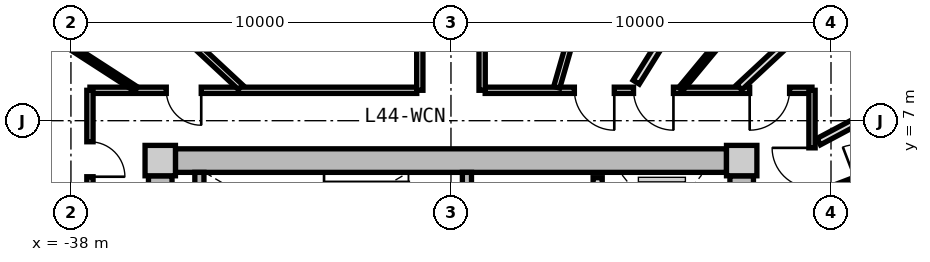
"""IFC4 building model, lengths in metres.
Left out: names, types, materials, properties, quantities, classifications, styles, units other than length and angle.
Written with IfcOpenShell. Run it as: python <this file> out.ifc"""

import sys

from ifc_helpers import new_model, si_unit, direction, frame, frame_2d, origin, origin_2d, place, context, subcontext, project, spatial, rectangle, extrude, source, transform, mapped, element, fill, save


model = new_model("IFC4")
c1 = context("Model", 3, precision=1e-05, world=origin(), true_north=direction((0.0, 1.0)))
c2 = subcontext(c1, "Body", "Model", "MODEL_VIEW")
j1 = project(units=[si_unit("LENGTHUNIT", "METRE"), si_unit("PLANEANGLEUNIT", "RADIAN")], contexts=[c1])
p1 = place(None, origin())
s1 = spatial("IfcSite", under=j1, at=p1, CompositionType="ELEMENT")
p2 = place(p1, origin())
s2 = spatial("IfcBuilding", under=s1, at=p2, CompositionType="ELEMENT")
p3 = place(p2, frame((0.0, 0.0, 143.45)))
s3 = spatial("IfcBuildingStorey", under=s2, at=p3, CompositionType="ELEMENT", Elevation=143.45)
m1 = source(origin(), c2, "Body", "SweptSolid", [
    extrude(rectangle(XDim=0.8, YDim=0.8, at=origin_2d()), origin(), (0.0, 0.0, 1.0), 3.05),
])
for number, where, z_axis, x_axis in (
    (1, (-20.35, 5.95, 0.0), (0.0, 0.0, 1.0), (1.0, 0.0, 0.0)),
    (2, (-35.65, 5.95, 0.0), (0.0, 0.0, 1.0), (1.0, 0.0, 0.0)),
):
    element("IfcColumn", number, at=place(p3, frame(where, z_axis=z_axis, x_axis=x_axis)), inside=s3, PredefinedType="COLUMN", context=c2, shape_type="MappedRepresentation", body=[
        mapped(m1, transform((0.0, 0.0, 0.0), x_axis=(1.0, 0.0, 0.0), y_axis=(0.0, 1.0, 0.0), z_axis=(0.0, 0.0, 1.0), scale=1.0)),
    ])
m2 = source(origin(), c2, "Body", "SweptSolid", [
    extrude(rectangle(XDim=14.5, YDim=0.62, at=frame_2d((7.25, 0.0))), origin(), (0.0, 0.0, 1.0), 2.81),
])
p4 = place(p3, frame((-35.25, 5.95, 0.0), z_axis=(0.0, 0.0, 1.0), x_axis=(1.0, 0.0, 0.0)))
e3 = element("IfcWall", 3, at=p4, inside=s3, PredefinedType="SHEAR", context=c2, shape_type="MappedRepresentation", body=[
    mapped(m2, transform((0.0, 0.0, 0.0), x_axis=(1.0, 0.0, 0.0), y_axis=(0.0, 1.0, 0.0), z_axis=(0.0, 0.0, 1.0), scale=1.0)),
])
m3 = source(origin(), c2, "Body", "SweptSolid", [
    extrude(rectangle(XDim=11.1, YDim=0.62, at=frame_2d((5.55, 0.0))), origin(), (0.0, 0.0, 1.0), 2.81),
])
p5 = place(p3, frame((-35.65, -5.55, 0.0), z_axis=(0.0, 0.0, 1.0), x_axis=(0.0, 1.0, 0.0)))
e4 = element("IfcWall", 4, at=p5, inside=s3, PredefinedType="SHEAR", context=c2, shape_type="MappedRepresentation", body=[
    mapped(m3, transform((0.0, 0.0, 0.0), x_axis=(1.0, 0.0, 0.0), y_axis=(0.0, 1.0, 0.0), z_axis=(0.0, 0.0, 1.0), scale=1.0)),
])
p6 = place(p5, frame((3.8, 0.0, 0.0)))
e5 = element("IfcOpeningElement", 5, at=p6, cuts=e4, PredefinedType="OPENING", context=c2, shape_type="SweptSolid", body=[
    extrude(rectangle(XDim=1.2, YDim=2.15, at=frame_2d((0.6, 1.075))), frame((0.0, 0.32, 0.0), z_axis=(0.0, -1.0, 0.0), x_axis=(1.0, 0.0, 0.0)), (0.0, 0.0, 1.0), 0.64),
])
p7 = place(p3, frame((-20.35, 5.55, 0.0), z_axis=(0.0, 0.0, 1.0), x_axis=(0.0, -1.0, 0.0)))
e6 = element("IfcWall", 6, at=p7, inside=s3, PredefinedType="SHEAR", context=c2, shape_type="MappedRepresentation", body=[
    mapped(m3, transform((0.0, 0.0, 0.0), x_axis=(1.0, 0.0, 0.0), y_axis=(0.0, 1.0, 0.0), z_axis=(0.0, 0.0, 1.0), scale=1.0)),
])
p8 = place(p7, frame((5.65, 0.0, 0.0)))
e7 = element("IfcOpeningElement", 7, at=p8, cuts=e6, PredefinedType="OPENING", context=c2, shape_type="SweptSolid", body=[
    extrude(rectangle(XDim=1.2, YDim=2.15, at=frame_2d((0.6, 1.075))), frame((0.0, 0.32, 0.0), z_axis=(0.0, -1.0, 0.0), x_axis=(1.0, 0.0, 0.0)), (0.0, 0.0, 1.0), 0.64),
])
m4 = source(origin(), c2, "Body", "SweptSolid", [
    extrude(rectangle(XDim=3.19, YDim=0.24, at=frame_2d((1.595, 0.0))), origin(), (0.0, 0.0, 1.0), 2.81),
])
p9 = place(p3, frame((-34.62, 2.45, 0.0), z_axis=(0.0, 0.0, 1.0), x_axis=(0.0, 1.0, 0.0)))
e8 = element("IfcWall", 8, at=p9, inside=s3, PredefinedType="PARTITIONING", context=c2, shape_type="MappedRepresentation", body=[
    mapped(m4, transform((0.0, 0.0, 0.0), x_axis=(1.0, 0.0, 0.0), y_axis=(0.0, 1.0, 0.0), z_axis=(0.0, 0.0, 1.0), scale=1.0)),
])
p10 = place(p3, frame((-27.58, 2.45, 0.0), z_axis=(0.0, 0.0, 1.0), x_axis=(0.0, 1.0, 0.0)))
e9 = element("IfcWall", 9, at=p10, inside=s3, PredefinedType="PARTITIONING", context=c2, shape_type="MappedRepresentation", body=[
    mapped(m4, transform((0.0, 0.0, 0.0), x_axis=(1.0, 0.0, 0.0), y_axis=(0.0, 1.0, 0.0), z_axis=(0.0, 0.0, 1.0), scale=1.0)),
])
p11 = place(p10, frame((0.55, 0.0, 0.0)))
e10 = element("IfcOpeningElement", 10, at=p11, cuts=e9, PredefinedType="OPENING", context=c2, shape_type="SweptSolid", body=[
    extrude(rectangle(XDim=1.1, YDim=2.15, at=frame_2d((0.55, 1.075))), frame((0.0, 0.13, 0.0), z_axis=(0.0, -1.0, 0.0), x_axis=(1.0, 0.0, 0.0)), (0.0, 0.0, 1.0), 0.26),
])
m5 = source(origin(), c2, "Body", "SweptSolid", [
    extrude(rectangle(XDim=5.0, YDim=0.24, at=frame_2d((2.5, 0.0))), origin(), (0.0, 0.0, 1.0), 2.795),
])
p12 = place(p3, frame((-24.14, 0.5, 0.0), z_axis=(0.0, 0.0, 1.0), x_axis=(0.0, 1.0, 0.0)))
e11 = element("IfcWall", 11, at=p12, inside=s3, PredefinedType="PARTITIONING", context=c2, shape_type="MappedRepresentation", body=[
    mapped(m5, transform((0.0, 0.0, 0.0), x_axis=(1.0, 0.0, 0.0), y_axis=(0.0, 1.0, 0.0), z_axis=(0.0, 0.0, 1.0), scale=1.0)),
])
p13 = place(p12, frame((3.05, 0.0, 0.0)))
e12 = element("IfcOpeningElement", 12, at=p13, cuts=e11, PredefinedType="OPENING", context=c2, shape_type="SweptSolid", body=[
    extrude(rectangle(XDim=1.3, YDim=2.2, at=frame_2d((0.65, 1.1))), frame((0.0, 0.13, 0.0), z_axis=(0.0, -1.0, 0.0), x_axis=(1.0, 0.0, 0.0)), (0.0, 0.0, 1.0), 0.26),
])
p14 = place(p12, frame((0.55, 0.0, 0.0)))
e13 = element("IfcOpeningElement", 13, at=p14, cuts=e11, PredefinedType="OPENING", context=c2, shape_type="SweptSolid", body=[
    extrude(rectangle(XDim=1.3, YDim=2.2, at=frame_2d((0.65, 1.1))), frame((0.0, 0.13, 0.0), z_axis=(0.0, -1.0, 0.0), x_axis=(1.0, 0.0, 0.0)), (0.0, 0.0, 1.0), 0.26),
])
m6 = source(origin(), c2, "Body", "SweptSolid", [
    extrude(rectangle(XDim=8.6, YDim=0.165, at=frame_2d((4.3, 0.0))), origin(), (0.0, 0.0, 1.0), 2.795),
])
p15 = place(p3, frame((-37.5, 7.8, 0.0), z_axis=(0.0, 0.0, 1.0), x_axis=(1.0, 0.0, 0.0)))
e14 = element("IfcWall", 14, at=p15, inside=s3, PredefinedType="PARTITIONING", context=c2, shape_type="MappedRepresentation", body=[
    mapped(m6, transform((0.0, 0.0, 0.0), x_axis=(1.0, 0.0, 0.0), y_axis=(0.0, 1.0, 0.0), z_axis=(0.0, 0.0, 1.0), scale=1.0)),
])
p16 = place(p15, frame((2.009, 0.0, 0.0)))
e15 = element("IfcOpeningElement", 15, at=p16, cuts=e14, PredefinedType="OPENING", context=c2, shape_type="SweptSolid", body=[
    extrude(rectangle(XDim=0.92, YDim=2.1, at=frame_2d((0.46, 1.05))), frame((0.0, 0.093, 0.0), z_axis=(0.0, -1.0, 0.0), x_axis=(1.0, 0.0, 0.0)), (0.0, 0.0, 1.0), 0.185),
])
p17 = place(p3, frame((-27.1, 7.8, 0.0), z_axis=(0.0, 0.0, 1.0), x_axis=(1.0, 0.0, 0.0)))
e16 = element("IfcWall", 16, at=p17, inside=s3, PredefinedType="PARTITIONING", context=c2, shape_type="MappedRepresentation", body=[
    mapped(m6, transform((0.0, 0.0, 0.0), x_axis=(1.0, 0.0, 0.0), y_axis=(0.0, 1.0, 0.0), z_axis=(0.0, 0.0, 1.0), scale=1.0)),
])
p18 = place(p17, frame((6.96, 0.0, 0.0)))
e17 = element("IfcOpeningElement", 17, at=p18, cuts=e16, PredefinedType="OPENING", context=c2, shape_type="SweptSolid", body=[
    extrude(rectangle(XDim=1.05, YDim=2.15, at=frame_2d((0.525, 1.075))), frame((0.0, 0.093, 0.0), z_axis=(0.0, -1.0, 0.0), x_axis=(1.0, 0.0, 0.0)), (0.0, 0.0, 1.0), 0.185),
])
p19 = place(p17, frame((3.904, 0.0, 0.0)))
e18 = element("IfcOpeningElement", 18, at=p19, cuts=e16, PredefinedType="OPENING", context=c2, shape_type="SweptSolid", body=[
    extrude(rectangle(XDim=1.05, YDim=2.15, at=frame_2d((0.525, 1.075))), frame((0.0, 0.093, 0.0), z_axis=(0.0, -1.0, 0.0), x_axis=(1.0, 0.0, 0.0)), (0.0, 0.0, 1.0), 0.185),
])
p20 = place(p17, frame((2.347, 0.0, 0.0)))
e19 = element("IfcOpeningElement", 19, at=p20, cuts=e16, PredefinedType="OPENING", context=c2, shape_type="SweptSolid", body=[
    extrude(rectangle(XDim=1.05, YDim=2.15, at=frame_2d((0.525, 1.075))), frame((0.0, 0.093, 0.0), z_axis=(0.0, -1.0, 0.0), x_axis=(1.0, 0.0, 0.0)), (0.0, 0.0, 1.0), 0.185),
])
m7 = source(origin(), c2, "Body", "SweptSolid", [
    extrude(rectangle(XDim=15.6, YDim=0.165, at=frame_2d((7.8, 0.0))), origin(), (0.0, 0.0, 1.0), 2.795),
])
p21 = place(p3, frame((-37.5, -7.8, 0.0), z_axis=(0.0, 0.0, 1.0), x_axis=(0.0, 1.0, 0.0)))
e20 = element("IfcWall", 20, at=p21, inside=s3, PredefinedType="PARTITIONING", context=c2, shape_type="MappedRepresentation", body=[
    mapped(m7, transform((0.0, 0.0, 0.0), x_axis=(1.0, 0.0, 0.0), y_axis=(0.0, 1.0, 0.0), z_axis=(0.0, 0.0, 1.0), scale=1.0)),
])
p22 = place(p21, frame((13.325, 0.0, 0.0)))
e21 = element("IfcOpeningElement", 21, at=p22, cuts=e20, PredefinedType="OPENING", context=c2, shape_type="SweptSolid", body=[
    extrude(rectangle(XDim=0.92, YDim=2.1, at=frame_2d((0.46, 1.05))), frame((0.0, 0.093, 0.0), z_axis=(0.0, -1.0, 0.0), x_axis=(1.0, 0.0, 0.0)), (0.0, 0.0, 1.0), 0.185),
])
p23 = place(p21, frame((5.628, 0.0, 0.0)))
e22 = element("IfcOpeningElement", 22, at=p23, cuts=e20, PredefinedType="OPENING", context=c2, shape_type="SweptSolid", body=[
    extrude(rectangle(XDim=1.25, YDim=2.2, at=frame_2d((0.625, 1.1))), frame((0.0, 0.093, 0.0), z_axis=(0.0, -1.0, 0.0), x_axis=(1.0, 0.0, 0.0)), (0.0, 0.0, 1.0), 0.185),
])
p24 = place(p3, frame((-18.5, 7.8, 0.0), z_axis=(0.0, 0.0, 1.0), x_axis=(0.0, -1.0, 0.0)))
e23 = element("IfcWall", 23, at=p24, inside=s3, PredefinedType="PARTITIONING", context=c2, shape_type="MappedRepresentation", body=[
    mapped(m7, transform((0.0, 0.0, 0.0), x_axis=(1.0, 0.0, 0.0), y_axis=(0.0, 1.0, 0.0), z_axis=(0.0, 0.0, 1.0), scale=1.0)),
])
p25 = place(p24, frame((8.314, 0.0, 0.0)))
e24 = element("IfcOpeningElement", 24, at=p25, cuts=e23, PredefinedType="OPENING", context=c2, shape_type="SweptSolid", body=[
    extrude(rectangle(XDim=1.25, YDim=2.2, at=frame_2d((0.625, 1.1))), frame((0.0, 0.093, 0.0), z_axis=(0.0, -1.0, 0.0), x_axis=(1.0, 0.0, 0.0)), (0.0, 0.0, 1.0), 0.185),
])
p26 = place(p24, frame((1.515, 0.0, 0.0)))
e25 = element("IfcOpeningElement", 25, at=p26, cuts=e23, PredefinedType="OPENING", context=c2, shape_type="SweptSolid", body=[
    extrude(rectangle(XDim=1.05, YDim=2.15, at=frame_2d((0.525, 1.075))), frame((0.0, 0.093, 0.0), z_axis=(0.0, -1.0, 0.0), x_axis=(1.0, 0.0, 0.0)), (0.0, 0.0, 1.0), 0.185),
])
m8 = source(origin(), c2, "Body", "SweptSolid", [
    extrude(rectangle(XDim=9.73, YDim=0.165, at=frame_2d((4.865, 0.0))), origin(), (0.0, 0.0, 1.0), 2.435),
])
p27 = place(p3, frame((-25.217, 7.88, 0.0), z_axis=(0.0, 0.0, 1.0), x_axis=(0.27679492614, 0.960929013436, 0.0)))
e26 = element("IfcWall", 26, at=p27, inside=s3, PredefinedType="PARTITIONING", context=c2, shape_type="MappedRepresentation", body=[
    mapped(m8, transform((0.0, 0.0, 0.0), x_axis=(1.0, 0.0, 0.0), y_axis=(0.0, 1.0, 0.0), z_axis=(0.0, 0.0, 1.0), scale=1.0)),
])
m9 = source(origin(), c2, "Body", "SweptSolid", [
    extrude(rectangle(XDim=7.648, YDim=0.165, at=frame_2d((3.824, 0.0))), origin(), (0.0, 0.0, 1.0), 2.345),
])
p28 = place(p3, frame((-33.538, 7.88, 0.0), z_axis=(0.0, 0.0, 1.0), x_axis=(-0.732167856666, 0.681124239522, 0.0)))
e27 = element("IfcWall", 27, at=p28, inside=s3, PredefinedType="PARTITIONING", context=c2, shape_type="MappedRepresentation", body=[
    mapped(m9, transform((0.0, 0.0, 0.0), x_axis=(1.0, 0.0, 0.0), y_axis=(0.0, 1.0, 0.0), z_axis=(0.0, 0.0, 1.0), scale=1.0)),
])
m10 = source(origin(), c2, "Body", "SweptSolid", [
    extrude(rectangle(XDim=8.235, YDim=0.165, at=frame_2d((4.118, 0.0))), origin(), (0.0, 0.0, 1.0), 2.795),
])
p29 = place(p3, frame((-28.82, 7.8, 0.0), z_axis=(0.0, 0.0, 1.0), x_axis=(0.0, 1.0, 0.0)))
e28 = element("IfcWall", 28, at=p29, inside=s3, PredefinedType="PARTITIONING", context=c2, shape_type="MappedRepresentation", body=[
    mapped(m10, transform((0.0, 0.0, 0.0), x_axis=(1.0, 0.0, 0.0), y_axis=(0.0, 1.0, 0.0), z_axis=(0.0, 0.0, 1.0), scale=1.0)),
])
p30 = place(p29, frame((3.593, 0.0, 0.0)))
e29 = element("IfcOpeningElement", 29, at=p30, cuts=e28, PredefinedType="OPENING", context=c2, shape_type="SweptSolid", body=[
    extrude(rectangle(XDim=1.05, YDim=2.15, at=frame_2d((0.525, 1.075))), frame((0.0, 0.093, 0.0), z_axis=(0.0, -1.0, 0.0), x_axis=(1.0, 0.0, 0.0)), (0.0, 0.0, 1.0), 0.185),
])
p31 = place(p3, frame((-27.18, 7.8, 0.0), z_axis=(0.0, 0.0, 1.0), x_axis=(0.0, 1.0, 0.0)))
e30 = element("IfcWall", 30, at=p31, inside=s3, PredefinedType="PARTITIONING", context=c2, shape_type="MappedRepresentation", body=[
    mapped(m10, transform((0.0, 0.0, 0.0), x_axis=(1.0, 0.0, 0.0), y_axis=(0.0, 1.0, 0.0), z_axis=(0.0, 0.0, 1.0), scale=1.0)),
])
p32 = place(p31, frame((3.593, 0.0, 0.0)))
e31 = element("IfcOpeningElement", 31, at=p32, cuts=e30, PredefinedType="OPENING", context=c2, shape_type="SweptSolid", body=[
    extrude(rectangle(XDim=1.05, YDim=2.15, at=frame_2d((0.525, 1.075))), frame((0.0, 0.093, 0.0), z_axis=(0.0, -1.0, 0.0), x_axis=(1.0, 0.0, 0.0)), (0.0, 0.0, 1.0), 0.185),
])
m11 = source(origin(), c2, "Body", "SweptSolid", [
    extrude(rectangle(XDim=6.193, YDim=0.19, at=frame_2d((3.096, 0.0))), origin(), (0.0, 0.0, 1.0), 2.345),
])
p33 = place(p3, frame((-37.58, 4.419, 0.0), z_axis=(0.0, 0.0, 1.0), x_axis=(-0.970309243466, 0.241867674657, 0.0)))
e32 = element("IfcWall", 32, at=p33, inside=s3, PredefinedType="PARTITIONING", context=c2, shape_type="MappedRepresentation", body=[
    mapped(m11, transform((0.0, 0.0, 0.0), x_axis=(1.0, 0.0, 0.0), y_axis=(0.0, 1.0, 0.0), z_axis=(0.0, 0.0, 1.0), scale=1.0)),
])
m12 = source(origin(), c2, "Body", "SweptSolid", [
    extrude(rectangle(XDim=5.197, YDim=0.14, at=frame_2d((2.598, 0.0))), origin(), (0.0, 0.0, 1.0), 2.795),
])
p34 = place(p3, frame((-36.286, 7.83, 0.0), z_axis=(0.0, 0.0, 1.0), x_axis=(-0.839929187515, 0.542696010637, 0.0)))
e33 = element("IfcWall", 33, at=p34, inside=s3, PredefinedType="PARTITIONING", context=c2, shape_type="MappedRepresentation", body=[
    mapped(m12, transform((0.0, 0.0, 0.0), x_axis=(1.0, 0.0, 0.0), y_axis=(0.0, 1.0, 0.0), z_axis=(0.0, 0.0, 1.0), scale=1.0)),
])
m13 = source(origin(), c2, "Body", "SweptSolid", [
    extrude(rectangle(XDim=8.305, YDim=0.19, at=frame_2d((4.153, 0.0))), origin(), (0.0, 0.0, 1.0), 2.345),
])
p35 = place(p3, frame((-18.42, 3.908, 0.0), z_axis=(0.0, 0.0, 1.0), x_axis=(0.970309994378, 0.241864662175, 0.0)))
e34 = element("IfcWall", 34, at=p35, inside=s3, PredefinedType="PARTITIONING", context=c2, shape_type="MappedRepresentation", body=[
    mapped(m13, transform((0.0, 0.0, 0.0), x_axis=(1.0, 0.0, 0.0), y_axis=(0.0, 1.0, 0.0), z_axis=(0.0, 0.0, 1.0), scale=1.0)),
])
m14 = source(origin(), c2, "Body", "SweptSolid", [
    extrude(rectangle(XDim=7.648, YDim=0.19, at=frame_2d((3.824, 0.0))), origin(), (0.0, 0.0, 1.0), 2.345),
])
p36 = place(p3, frame((-20.413, 7.88, 0.0), z_axis=(0.0, 0.0, 1.0), x_axis=(0.732182665826, 0.681108320213, 0.0)))
e35 = element("IfcWall", 35, at=p36, inside=s3, PredefinedType="PARTITIONING", context=c2, shape_type="MappedRepresentation", body=[
    mapped(m14, transform((0.0, 0.0, 0.0), x_axis=(1.0, 0.0, 0.0), y_axis=(0.0, 1.0, 0.0), z_axis=(0.0, 0.0, 1.0), scale=1.0)),
])
m15 = source(origin(), c2, "Body", "SweptSolid", [
    extrude(rectangle(XDim=6.499, YDim=0.19, at=frame_2d((3.25, 0.0))), origin(), (0.0, 0.0, 1.0), 2.795),
])
p37 = place(p3, frame((-18.324, 6.449, 0.0), z_axis=(0.0, 0.0, 1.0), x_axis=(0.882715595921, 0.469907625729, 0.0)))
e36 = element("IfcWall", 36, at=p37, inside=s3, PredefinedType="PARTITIONING", context=c2, shape_type="MappedRepresentation", body=[
    mapped(m15, transform((0.0, 0.0, 0.0), x_axis=(1.0, 0.0, 0.0), y_axis=(0.0, 1.0, 0.0), z_axis=(0.0, 0.0, 1.0), scale=1.0)),
])
m16 = source(origin(), c2, "Body", "SweptSolid", [
    extrude(rectangle(XDim=3.295, YDim=0.14, at=frame_2d((1.647, 0.0))), origin(), (0.0, 0.0, 1.0), 2.795),
])
p38 = place(p3, frame((-18.47, 5.023, 0.0), z_axis=(0.0, 0.0, 1.0), x_axis=(0.934202224769, 0.356743890258, 0.0)))
e37 = element("IfcWall", 37, at=p38, inside=s3, PredefinedType="PARTITIONING", context=c2, shape_type="MappedRepresentation", body=[
    mapped(m16, transform((0.0, 0.0, 0.0), x_axis=(1.0, 0.0, 0.0), y_axis=(0.0, 1.0, 0.0), z_axis=(0.0, 0.0, 1.0), scale=1.0)),
])
p39 = place(p38, frame((1.188, 0.0, 0.0)))
e38 = element("IfcOpeningElement", 38, at=p39, cuts=e37, PredefinedType="OPENING", context=c2, shape_type="SweptSolid", body=[
    extrude(rectangle(XDim=0.92, YDim=2.1, at=frame_2d((0.46, 1.05))), frame((0.0, 0.08, 0.0), z_axis=(0.0, -1.0, 0.0), x_axis=(1.0, 0.0, 0.0)), (0.0, 0.0, 1.0), 0.16),
])
m17 = source(origin(), c2, "Body", "SweptSolid", [
    extrude(rectangle(XDim=8.422, YDim=0.19, at=frame_2d((4.211, 0.0))), origin(), (0.0, 0.0, 1.0), 2.795),
])
p40 = place(p3, frame((-23.125, 8.014, 0.0), z_axis=(0.0, 0.0, 1.0), x_axis=(0.52925352896, 0.848463730565, 0.0)))
e39 = element("IfcWall", 39, at=p40, inside=s3, PredefinedType="PARTITIONING", context=c2, shape_type="MappedRepresentation", body=[
    mapped(m17, transform((0.0, 0.0, 0.0), x_axis=(1.0, 0.0, 0.0), y_axis=(0.0, 1.0, 0.0), z_axis=(0.0, 0.0, 1.0), scale=1.0)),
])
m18 = source(origin(), c2, "Body", "SweptSolid", [
    extrude(rectangle(XDim=3.593, YDim=0.14, at=frame_2d((1.797, 0.0))), origin(), (0.0, 0.0, 1.0), 2.795),
])
p41 = place(p3, frame((-21.955, 7.83, 0.0), z_axis=(0.0, 0.0, 1.0), x_axis=(0.638271060163, 0.769811700196, 0.0)))
e40 = element("IfcWall", 40, at=p41, inside=s3, PredefinedType="PARTITIONING", context=c2, shape_type="MappedRepresentation", body=[
    mapped(m18, transform((0.0, 0.0, 0.0), x_axis=(1.0, 0.0, 0.0), y_axis=(0.0, 1.0, 0.0), z_axis=(0.0, 0.0, 1.0), scale=1.0)),
])
p42 = place(p41, frame((1.337, 0.0, 0.0)))
e41 = element("IfcOpeningElement", 41, at=p42, cuts=e40, PredefinedType="OPENING", context=c2, shape_type="SweptSolid", body=[
    extrude(rectangle(XDim=0.92, YDim=2.1, at=frame_2d((0.46, 1.05))), frame((0.0, 0.08, 0.0), z_axis=(0.0, -1.0, 0.0), x_axis=(1.0, 0.0, 0.0)), (0.0, 0.0, 1.0), 0.16),
])
m19 = source(origin(), c2, "Body", "SweptSolid", [
    extrude(rectangle(XDim=0.92, YDim=2.1, at=frame_2d((0.46, 1.05))), frame((0.0, 0.025, 0.0), z_axis=(0.0, -1.0, 0.0), x_axis=(1.0, 0.0, 0.0)), (0.0, 0.0, 1.0), 0.05),
])
p43 = place(p16, frame((0.92, 0.0, 0.0), z_axis=(0.0, 0.0, 1.0), x_axis=(-1.0, 0.0, 0.0)))
e42 = element("IfcDoor", 42, at=p43, inside=s3, OperationType="SINGLE_SWING_LEFT", PredefinedType="DOOR", context=c2, shape_type="MappedRepresentation", body=[
    mapped(m19, transform((0.0, 0.0, 0.0), x_axis=(1.0, 0.0, 0.0), y_axis=(0.0, 1.0, 0.0), z_axis=(0.0, 0.0, 1.0), scale=1.0)),
])
fill(e15, e42)
p44 = place(p22, frame((0.92, 0.0, 0.0), z_axis=(0.0, 0.0, 1.0), x_axis=(-1.0, 0.0, 0.0)))
e43 = element("IfcDoor", 43, at=p44, inside=s3, OperationType="SINGLE_SWING_RIGHT", PredefinedType="DOOR", context=c2, shape_type="MappedRepresentation", body=[
    mapped(m19, transform((0.0, 0.0, 0.0), x_axis=(1.0, 0.0, 0.0), y_axis=(0.0, 1.0, 0.0), z_axis=(0.0, 0.0, 1.0), scale=1.0)),
])
fill(e21, e43)
m20 = source(origin(), c2, "Body", "SweptSolid", [
    extrude(rectangle(XDim=1.05, YDim=2.15, at=frame_2d((0.525, 1.075))), frame((0.0, 0.025, 0.0), z_axis=(0.0, -1.0, 0.0), x_axis=(1.0, 0.0, 0.0)), (0.0, 0.0, 1.0), 0.05),
])
p45 = place(p26, frame((1.05, 0.0, 0.0), z_axis=(0.0, 0.0, 1.0), x_axis=(-1.0, 0.0, 0.0)))
e44 = element("IfcDoor", 44, at=p45, inside=s3, OperationType="SINGLE_SWING_RIGHT", PredefinedType="DOOR", context=c2, shape_type="MappedRepresentation", body=[
    mapped(m20, transform((0.0, 0.0, 0.0), x_axis=(1.0, 0.0, 0.0), y_axis=(0.0, 1.0, 0.0), z_axis=(0.0, 0.0, 1.0), scale=1.0)),
])
fill(e25, e44)
p46 = place(p18, frame((1.05, 0.0, 0.0), z_axis=(0.0, 0.0, 1.0), x_axis=(-1.0, 0.0, 0.0)))
e45 = element("IfcDoor", 45, at=p46, inside=s3, OperationType="SINGLE_SWING_RIGHT", PredefinedType="DOOR", context=c2, shape_type="MappedRepresentation", body=[
    mapped(m20, transform((0.0, 0.0, 0.0), x_axis=(1.0, 0.0, 0.0), y_axis=(0.0, 1.0, 0.0), z_axis=(0.0, 0.0, 1.0), scale=1.0)),
])
fill(e17, e45)
p47 = place(p19, frame((1.05, 0.0, 0.0), z_axis=(0.0, 0.0, 1.0), x_axis=(-1.0, 0.0, 0.0)))
e46 = element("IfcDoor", 46, at=p47, inside=s3, OperationType="SINGLE_SWING_LEFT", PredefinedType="DOOR", context=c2, shape_type="MappedRepresentation", body=[
    mapped(m20, transform((0.0, 0.0, 0.0), x_axis=(1.0, 0.0, 0.0), y_axis=(0.0, 1.0, 0.0), z_axis=(0.0, 0.0, 1.0), scale=1.0)),
])
fill(e18, e46)
p48 = place(p20, frame((1.05, 0.0, 0.0), z_axis=(0.0, 0.0, 1.0), x_axis=(-1.0, 0.0, 0.0)))
e47 = element("IfcDoor", 47, at=p48, inside=s3, OperationType="SINGLE_SWING_LEFT", PredefinedType="DOOR", context=c2, shape_type="MappedRepresentation", body=[
    mapped(m20, transform((0.0, 0.0, 0.0), x_axis=(1.0, 0.0, 0.0), y_axis=(0.0, 1.0, 0.0), z_axis=(0.0, 0.0, 1.0), scale=1.0)),
])
fill(e19, e47)
save(model, sys.argv[1])
